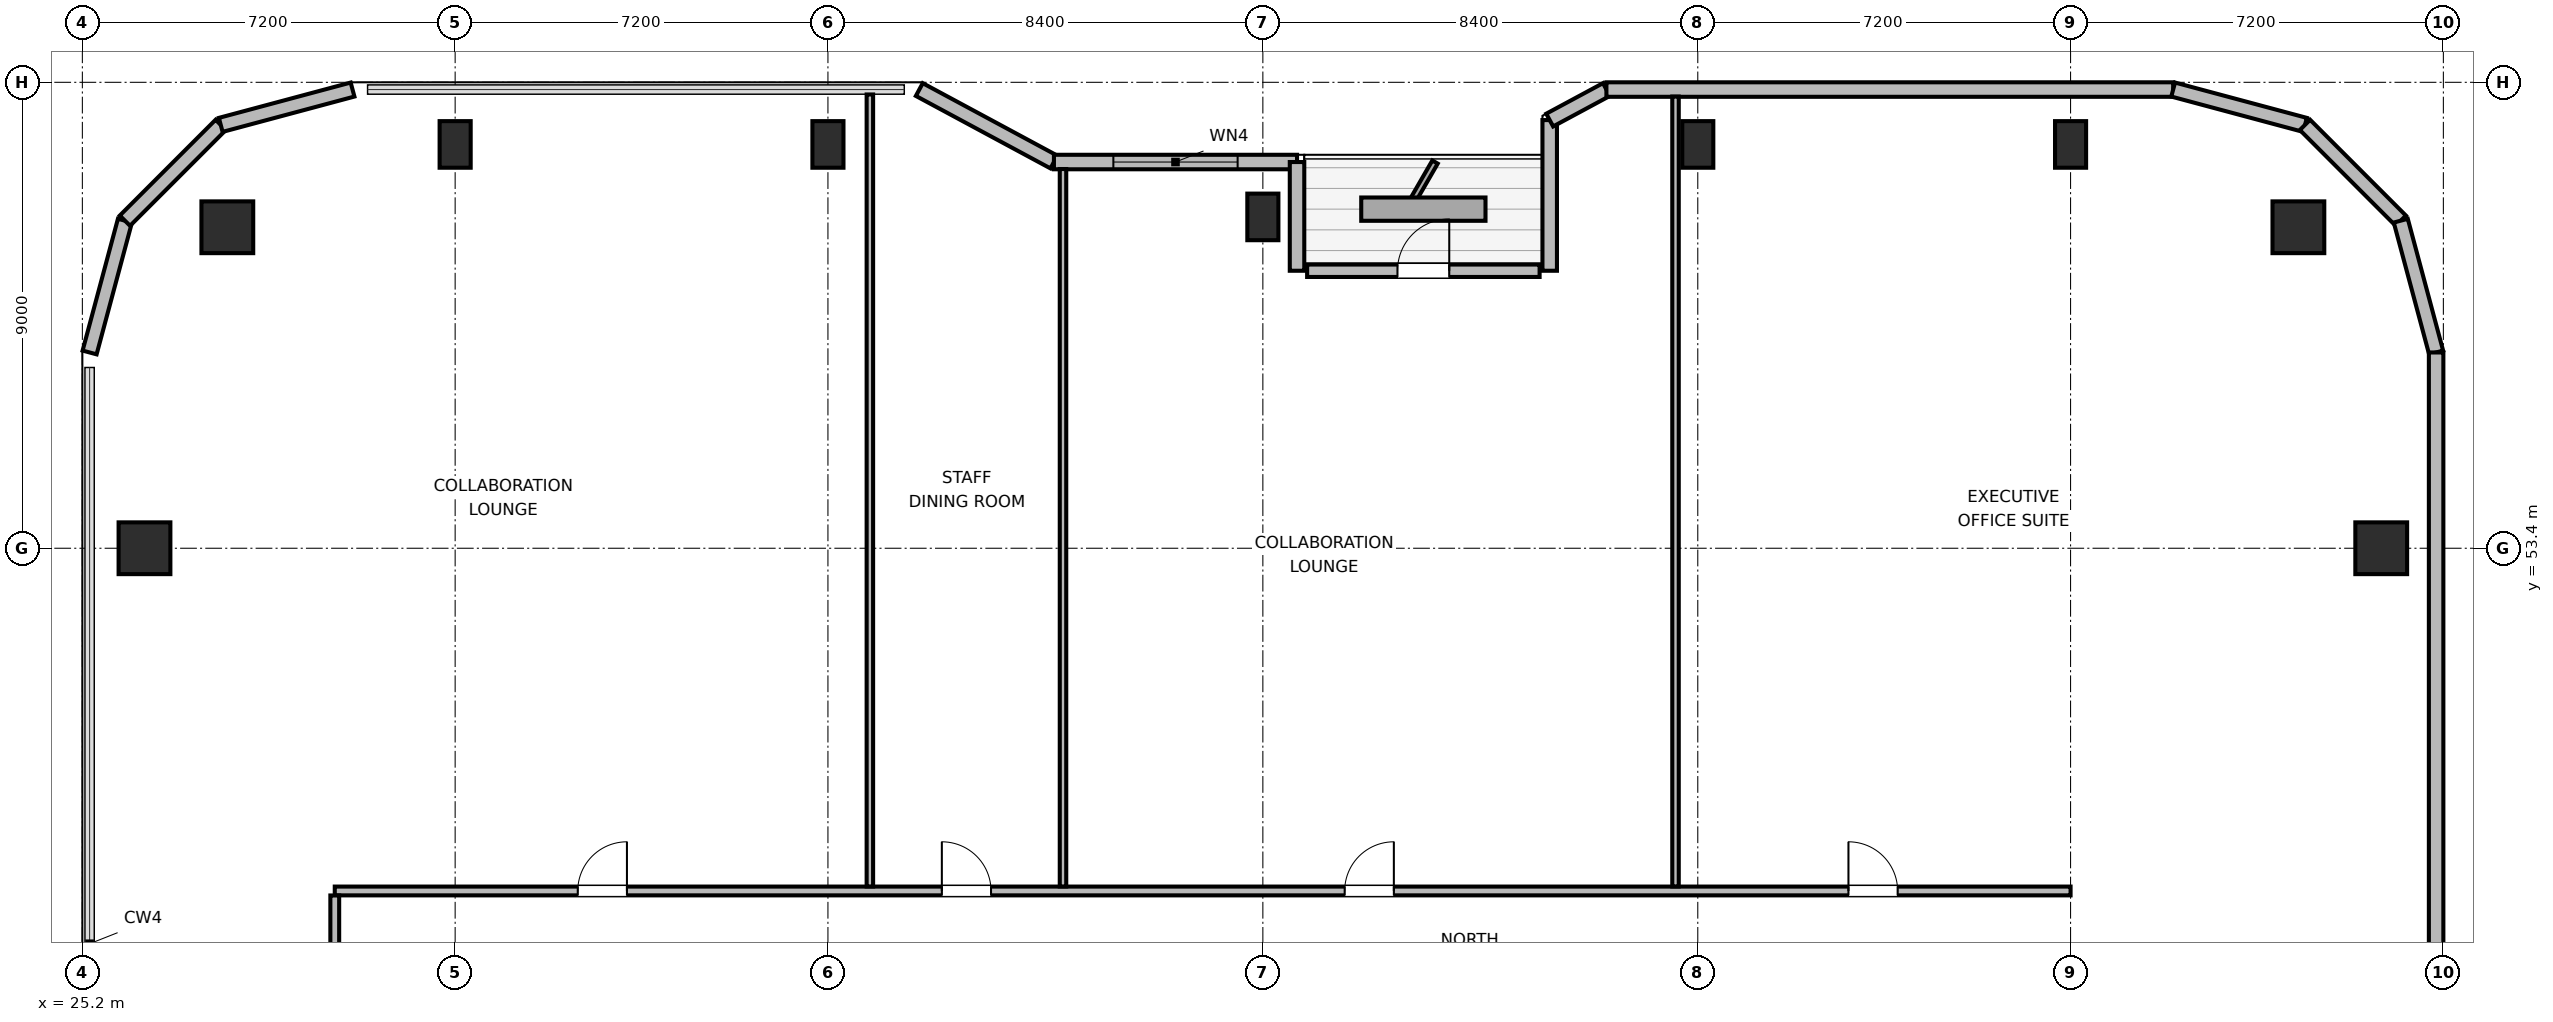
"""IFC4 building model, lengths in metres.
Left out: names, types, materials, properties, quantities, classifications, styles, units other than length and angle.
Written with IfcOpenShell. Run it as: python <this file> out.ifc"""

import sys

from ifc_helpers import new_model, si_unit, direction, frame, frame_2d, origin, origin_2d, place, context, subcontext, project, spatial, rectangle, circle, extrude, element, fill, save


model = new_model("IFC4")
c1 = context("Model", 3, precision=1e-05, world=origin(), true_north=direction((0.0, 1.0)))
c2 = subcontext(c1, "Body", "Model", "MODEL_VIEW")
j1 = project(units=[si_unit("LENGTHUNIT", "METRE"), si_unit("PLANEANGLEUNIT", "RADIAN")], contexts=[c1])
p1 = place(None, origin())
s1 = spatial("IfcSite", under=j1, at=p1, CompositionType="ELEMENT")
p2 = place(p1, origin())
s2 = spatial("IfcBuilding", under=s1, at=p2, CompositionType="ELEMENT")
p3 = place(p2, frame((0.0, 0.0, 251.1)))
s3 = spatial("IfcBuildingStorey", under=s2, at=p3, CompositionType="ELEMENT", Elevation=251.1)
for number, where, z_axis, x_axis in (
    (1, (68.0, 59.6, 0.0), (0.0, 0.0, 1.0), (1.0, 0.0, 0.0)),
    (2, (28.0, 59.6, 0.0), (0.0, 0.0, 1.0), (1.0, 0.0, 0.0)),
):
    element("IfcColumn", number, at=place(p3, frame(where, z_axis=z_axis, x_axis=x_axis)), inside=s3, PredefinedType="COLUMN", context=c2, shape_type="SweptSolid", body=[
        extrude(circle(Radius=0.5, at=origin_2d()), origin(), (0.0, 0.0, 1.0), 3.9),
    ])
for number, where, z_axis, x_axis in (
    (3, (32.4, 61.2, 0.0), (0.0, 0.0, 1.0), (1.0, 0.0, 0.0)),
    (4, (39.6, 61.2, 0.0), (0.0, 0.0, 1.0), (1.0, 0.0, 0.0)),
    (5, (48.0, 59.8, 0.0), (0.0, 0.0, 1.0), (1.0, 0.0, 0.0)),
    (6, (56.4, 61.2, 0.0), (0.0, 0.0, 1.0), (1.0, 0.0, 0.0)),
    (7, (63.6, 61.2, 0.0), (0.0, 0.0, 1.0), (1.0, 0.0, 0.0)),
):
    element("IfcColumn", number, at=place(p3, frame(where, z_axis=z_axis, x_axis=x_axis)), inside=s3, PredefinedType="COLUMN", context=c2, shape_type="SweptSolid", body=[
        extrude(rectangle(XDim=0.6, YDim=0.9, at=origin_2d()), origin(), (0.0, 0.0, 1.0), 3.9),
    ])
for number, where, z_axis, x_axis in (
    (8, (26.4, 53.4, 0.0), (0.0, 0.0, 1.0), (1.0, 0.0, 0.0)),
    (9, (69.6, 53.4, 0.0), (0.0, 0.0, 1.0), (1.0, 0.0, 0.0)),
):
    element("IfcColumn", number, at=place(p3, frame(where, z_axis=z_axis, x_axis=x_axis)), inside=s3, PredefinedType="COLUMN", context=c2, shape_type="SweptSolid", body=[
        extrude(rectangle(XDim=1.0, YDim=1.0, at=origin_2d()), origin(), (0.0, 0.0, 1.0), 3.9),
    ])
p4 = place(p3, frame((25.34, 57.182, 0.0), z_axis=(0.0, 0.0, 1.0), x_axis=(0.2588904131, 0.965906700466, 0.0)))
e10 = element("IfcWall", 10, at=p4, inside=s3, PredefinedType="SOLIDWALL", context=c2, shape_type="SweptSolid", body=[
    extrude(rectangle(XDim=2.636, YDim=0.28, at=frame_2d((1.318, 0.0))), origin(), (0.0, 0.0, 1.0), 3.68),
])
p5 = place(p3, frame((26.022, 59.728, 0.0), z_axis=(0.0, 0.0, 1.0), x_axis=(0.707153437963, 0.707060121331, 0.0)))
e11 = element("IfcWall", 11, at=p5, inside=s3, PredefinedType="SOLIDWALL", context=c2, shape_type="SweptSolid", body=[
    extrude(rectangle(XDim=2.616, YDim=0.28, at=frame_2d((1.308, 0.0))), origin(), (0.0, 0.0, 1.0), 3.68),
])
p6 = place(p3, frame((27.873, 61.577, 0.0), z_axis=(0.0, 0.0, 1.0), x_axis=(0.965883534663, 0.258976828051, 0.0)))
e12 = element("IfcWall", 12, at=p6, inside=s3, PredefinedType="SOLIDWALL", context=c2, shape_type="SweptSolid", body=[
    extrude(rectangle(XDim=2.636, YDim=0.28, at=frame_2d((1.318, 0.0))), origin(), (0.0, 0.0, 1.0), 3.68),
])
p7 = place(p3, frame((41.365, 62.26, 0.0), z_axis=(0.0, 0.0, 1.0), x_axis=(0.880473754814, -0.474094892488, 0.0)))
e13 = element("IfcWall", 13, at=p7, inside=s3, PredefinedType="SOLIDWALL", context=c2, shape_type="SweptSolid", body=[
    extrude(rectangle(XDim=2.953, YDim=0.28, at=frame_2d((1.477, 0.0))), origin(), (0.0, 0.0, 1.0), 2.195),
])
p8 = place(p3, frame((43.965, 60.86, 0.0), z_axis=(0.0, 0.0, 1.0), x_axis=(1.0, 0.0, 0.0)))
e14 = element("IfcWall", 14, at=p8, inside=s3, PredefinedType="SOLIDWALL", context=c2, shape_type="SweptSolid", body=[
    extrude(rectangle(XDim=4.695, YDim=0.28, at=frame_2d((2.348, 0.0))), origin(), (0.0, 0.0, 1.0), 2.195),
])
p9 = place(p8, frame((1.148, 0.0, 0.85)))
e15 = element("IfcOpeningElement", 15, at=p9, cuts=e14, PredefinedType="OPENING", context=c2, shape_type="SweptSolid", body=[
    extrude(rectangle(XDim=2.4, YDim=1.15, at=frame_2d((1.2, 0.575))), frame((0.0, 0.15, 0.0), z_axis=(0.0, -1.0, 0.0), x_axis=(1.0, 0.0, 0.0)), (0.0, 0.0, 1.0), 0.3),
])
p10 = place(p3, frame((48.66, 60.86, 0.0), z_axis=(0.0, 0.0, 1.0), x_axis=(0.0, -1.0, 0.0)))
e16 = element("IfcWall", 16, at=p10, inside=s3, PredefinedType="SOLIDWALL", context=c2, shape_type="SweptSolid", body=[
    extrude(rectangle(XDim=2.1, YDim=0.28, at=frame_2d((1.05, 0.0))), origin(), (0.0, 0.0, 1.0), 2.195),
])
p11 = place(p3, frame((48.855, 58.76, 0.0), z_axis=(0.0, 0.0, 1.0), x_axis=(1.0, 0.0, 0.0)))
e17 = element("IfcWall", 17, at=p11, inside=s3, PredefinedType="SOLIDWALL", context=c2, shape_type="SweptSolid", body=[
    extrude(rectangle(XDim=4.49, YDim=0.24, at=frame_2d((2.245, 0.0))), origin(), (0.0, 0.0, 1.0), 2.195),
])
p12 = place(p11, frame((1.745, 0.0, 0.0)))
e18 = element("IfcOpeningElement", 18, at=p12, cuts=e17, PredefinedType="OPENING", context=c2, shape_type="SweptSolid", body=[
    extrude(rectangle(XDim=1.0, YDim=2.02, at=frame_2d((0.5, 1.01))), frame((0.0, 0.13, 0.0), z_axis=(0.0, -1.0, 0.0), x_axis=(1.0, 0.0, 0.0)), (0.0, 0.0, 1.0), 0.26),
])
p13 = place(p3, frame((53.54, 58.76, 0.0), z_axis=(0.0, 0.0, 1.0), x_axis=(0.0, 1.0, 0.0)))
e19 = element("IfcWall", 19, at=p13, inside=s3, PredefinedType="SOLIDWALL", context=c2, shape_type="SweptSolid", body=[
    extrude(rectangle(XDim=2.91, YDim=0.28, at=frame_2d((1.455, 0.0))), origin(), (0.0, 0.0, 1.0), 2.195),
])
p14 = place(p3, frame((53.54, 61.67, 0.0), z_axis=(0.0, 0.0, 1.0), x_axis=(0.880515214249, 0.474017887296, 0.0)))
e20 = element("IfcWall", 20, at=p14, inside=s3, PredefinedType="SOLIDWALL", context=c2, shape_type="SweptSolid", body=[
    extrude(rectangle(XDim=1.244, YDim=0.28, at=frame_2d((0.622, 0.0))), origin(), (0.0, 0.0, 1.0), 3.68),
])
p15 = place(p3, frame((54.635, 62.26, 0.0), z_axis=(0.0, 0.0, 1.0), x_axis=(1.0, 0.0, 0.0)))
e21 = element("IfcWall", 21, at=p15, inside=s3, PredefinedType="SOLIDWALL", context=c2, shape_type="SweptSolid", body=[
    extrude(rectangle(XDim=10.946, YDim=0.28, at=frame_2d((5.473, 0.0))), origin(), (0.0, 0.0, 1.0), 3.68),
])
p16 = place(p3, frame((65.582, 62.26, 0.0), z_axis=(0.0, 0.0, 1.0), x_axis=(0.965883534663, -0.258976828051, 0.0)))
e22 = element("IfcWall", 22, at=p16, inside=s3, PredefinedType="SOLIDWALL", context=c2, shape_type="SweptSolid", body=[
    extrude(rectangle(XDim=2.636, YDim=0.28, at=frame_2d((1.318, 0.0))), origin(), (0.0, 0.0, 1.0), 3.68),
])
p17 = place(p3, frame((68.127, 61.577, 0.0), z_axis=(0.0, 0.0, 1.0), x_axis=(0.707153437963, -0.707060121331, 0.0)))
e23 = element("IfcWall", 23, at=p17, inside=s3, PredefinedType="SOLIDWALL", context=c2, shape_type="SweptSolid", body=[
    extrude(rectangle(XDim=2.616, YDim=0.28, at=frame_2d((1.308, 0.0))), origin(), (0.0, 0.0, 1.0), 3.68),
])
p18 = place(p3, frame((69.978, 59.728, 0.0), z_axis=(0.0, 0.0, 1.0), x_axis=(0.2588904131, -0.965906700466, 0.0)))
e24 = element("IfcWall", 24, at=p18, inside=s3, PredefinedType="SOLIDWALL", context=c2, shape_type="SweptSolid", body=[
    extrude(rectangle(XDim=2.636, YDim=0.28, at=frame_2d((1.318, 0.0))), origin(), (0.0, 0.0, 1.0), 3.68),
])
p19 = place(p3, frame((70.66, 57.182, 0.0), z_axis=(0.0, 0.0, 1.0), x_axis=(0.0, -1.0, 0.0)))
e25 = element("IfcWall", 25, at=p19, inside=s3, PredefinedType="SOLIDWALL", context=c2, shape_type="SweptSolid", body=[
    extrude(rectangle(XDim=14.442, YDim=0.28, at=frame_2d((7.221, 0.0))), origin(), (0.0, 0.0, 1.0), 3.68),
])
p20 = place(p3, frame((30.075, 46.78, 0.0), z_axis=(0.0, 0.0, 1.0), x_axis=(1.0, 0.0, 0.0)))
e26 = element("IfcWall", 26, at=p20, inside=s3, PredefinedType="PARTITIONING", context=c2, shape_type="SweptSolid", body=[
    extrude(rectangle(XDim=33.525, YDim=0.17, at=frame_2d((16.763, 0.0))), origin(), (0.0, 0.0, 1.0), 3.68),
])
p21 = place(p20, frame((4.693, 0.0, 0.0)))
e27 = element("IfcOpeningElement", 27, at=p21, cuts=e26, PredefinedType="OPENING", context=c2, shape_type="SweptSolid", body=[
    extrude(rectangle(XDim=0.95, YDim=2.04, at=frame_2d((0.475, 1.02))), frame((0.0, 0.095, 0.0), z_axis=(0.0, -1.0, 0.0), x_axis=(1.0, 0.0, 0.0)), (0.0, 0.0, 1.0), 0.19),
])
p22 = place(p20, frame((11.725, 0.0, 0.0)))
e28 = element("IfcOpeningElement", 28, at=p22, cuts=e26, PredefinedType="OPENING", context=c2, shape_type="SweptSolid", body=[
    extrude(rectangle(XDim=0.95, YDim=2.04, at=frame_2d((0.475, 1.02))), frame((0.0, 0.095, 0.0), z_axis=(0.0, -1.0, 0.0), x_axis=(1.0, 0.0, 0.0)), (0.0, 0.0, 1.0), 0.19),
])
p23 = place(p20, frame((19.505, 0.0, 0.0)))
e29 = element("IfcOpeningElement", 29, at=p23, cuts=e26, PredefinedType="OPENING", context=c2, shape_type="SweptSolid", body=[
    extrude(rectangle(XDim=0.95, YDim=2.04, at=frame_2d((0.475, 1.02))), frame((0.0, 0.095, 0.0), z_axis=(0.0, -1.0, 0.0), x_axis=(1.0, 0.0, 0.0)), (0.0, 0.0, 1.0), 0.19),
])
p24 = place(p20, frame((29.235, 0.0, 0.0)))
e30 = element("IfcOpeningElement", 30, at=p24, cuts=e26, PredefinedType="OPENING", context=c2, shape_type="SweptSolid", body=[
    extrude(rectangle(XDim=0.95, YDim=2.04, at=frame_2d((0.475, 1.02))), frame((0.0, 0.095, 0.0), z_axis=(0.0, -1.0, 0.0), x_axis=(1.0, 0.0, 0.0)), (0.0, 0.0, 1.0), 0.19),
])
p25 = place(p3, frame((30.075, 25.307, 0.0), z_axis=(0.0, 0.0, 1.0), x_axis=(0.0, 1.0, 0.0)))
e31 = element("IfcWall", 31, at=p25, inside=s3, PredefinedType="PARTITIONING", context=c2, shape_type="SweptSolid", body=[
    extrude(rectangle(XDim=21.386, YDim=0.17, at=frame_2d((10.693, 0.0))), origin(), (0.0, 0.0, 1.0), 3.68),
])
p26 = place(p25, frame((4.428, 0.0, 0.0)))
e32 = element("IfcOpeningElement", 32, at=p26, cuts=e31, PredefinedType="OPENING", context=c2, shape_type="SweptSolid", body=[
    extrude(rectangle(XDim=0.95, YDim=2.04, at=frame_2d((0.475, 1.02))), frame((0.0, 0.095, 0.0), z_axis=(0.0, -1.0, 0.0), x_axis=(1.0, 0.0, 0.0)), (0.0, 0.0, 1.0), 0.19),
])
p27 = place(p25, frame((15.208, 0.0, 0.0)))
e33 = element("IfcOpeningElement", 33, at=p27, cuts=e31, PredefinedType="OPENING", context=c2, shape_type="SweptSolid", body=[
    extrude(rectangle(XDim=0.95, YDim=2.04, at=frame_2d((0.475, 1.02))), frame((0.0, 0.095, 0.0), z_axis=(0.0, -1.0, 0.0), x_axis=(1.0, 0.0, 0.0)), (0.0, 0.0, 1.0), 0.19),
])
p28 = place(p3, frame((40.41, 46.867, 0.0), z_axis=(0.0, 0.0, 1.0), x_axis=(0.0, 1.0, 0.0)))
e34 = element("IfcWall", 34, at=p28, inside=s3, PredefinedType="PARTITIONING", context=c2, shape_type="SweptSolid", body=[
    extrude(rectangle(XDim=15.298, YDim=0.125, at=frame_2d((7.649, 0.0))), origin(), (0.0, 0.0, 1.0), 3.023),
])
p29 = place(p3, frame((44.14, 46.867, 0.0), z_axis=(0.0, 0.0, 1.0), x_axis=(0.0, 1.0, 0.0)))
e35 = element("IfcWall", 35, at=p29, inside=s3, PredefinedType="PARTITIONING", context=c2, shape_type="SweptSolid", body=[
    extrude(rectangle(XDim=13.858, YDim=0.125, at=frame_2d((6.929, 0.0))), origin(), (0.0, 0.0, 1.0), 3.023),
])
p30 = place(p3, frame((55.97, 46.867, 0.0), z_axis=(0.0, 0.0, 1.0), x_axis=(0.0, 1.0, 0.0)))
e36 = element("IfcWall", 36, at=p30, inside=s3, PredefinedType="PARTITIONING", context=c2, shape_type="SweptSolid", body=[
    extrude(rectangle(XDim=15.258, YDim=0.125, at=frame_2d((7.629, 0.0))), origin(), (0.0, 0.0, 1.0), 2.195),
])
p31 = place(p9, origin())
e37 = element("IfcWindow", 37, at=p31, inside=s3, PartitioningType="SINGLE_PANEL", PredefinedType="WINDOW", context=c2, shape_type="SweptSolid", body=[
    extrude(rectangle(XDim=2.4, YDim=1.15, at=frame_2d((1.2, 0.575))), frame((0.0, 0.03, 0.0), z_axis=(0.0, -1.0, 0.0), x_axis=(1.0, 0.0, 0.0)), (0.0, 0.0, 1.0), 0.06),
])
fill(e15, e37)
p32 = place(p12, origin())
e38 = element("IfcDoor", 38, at=p32, inside=s3, OperationType="SINGLE_SWING_RIGHT", PredefinedType="DOOR", context=c2, shape_type="SweptSolid", body=[
    extrude(rectangle(XDim=1.0, YDim=2.02, at=frame_2d((0.5, 1.01))), frame((0.0, 0.025, 0.0), z_axis=(0.0, -1.0, 0.0), x_axis=(1.0, 0.0, 0.0)), (0.0, 0.0, 1.0), 0.05),
])
fill(e18, e38)
p33 = place(p21, origin())
e39 = element("IfcDoor", 39, at=p33, inside=s3, OperationType="SINGLE_SWING_RIGHT", PredefinedType="DOOR", context=c2, shape_type="SweptSolid", body=[
    extrude(rectangle(XDim=0.95, YDim=2.04, at=frame_2d((0.475, 1.02))), frame((0.0, 0.025, 0.0), z_axis=(0.0, -1.0, 0.0), x_axis=(1.0, 0.0, 0.0)), (0.0, 0.0, 1.0), 0.05),
])
fill(e27, e39)
p34 = place(p22, origin())
e40 = element("IfcDoor", 40, at=p34, inside=s3, OperationType="SINGLE_SWING_LEFT", PredefinedType="DOOR", context=c2, shape_type="SweptSolid", body=[
    extrude(rectangle(XDim=0.95, YDim=2.04, at=frame_2d((0.475, 1.02))), frame((0.0, 0.025, 0.0), z_axis=(0.0, -1.0, 0.0), x_axis=(1.0, 0.0, 0.0)), (0.0, 0.0, 1.0), 0.05),
])
fill(e28, e40)
p35 = place(p23, origin())
e41 = element("IfcDoor", 41, at=p35, inside=s3, OperationType="SINGLE_SWING_RIGHT", PredefinedType="DOOR", context=c2, shape_type="SweptSolid", body=[
    extrude(rectangle(XDim=0.95, YDim=2.04, at=frame_2d((0.475, 1.02))), frame((0.0, 0.025, 0.0), z_axis=(0.0, -1.0, 0.0), x_axis=(1.0, 0.0, 0.0)), (0.0, 0.0, 1.0), 0.05),
])
fill(e29, e41)
p36 = place(p24, origin())
e42 = element("IfcDoor", 42, at=p36, inside=s3, OperationType="SINGLE_SWING_LEFT", PredefinedType="DOOR", context=c2, shape_type="SweptSolid", body=[
    extrude(rectangle(XDim=0.95, YDim=2.04, at=frame_2d((0.475, 1.02))), frame((0.0, 0.025, 0.0), z_axis=(0.0, -1.0, 0.0), x_axis=(1.0, 0.0, 0.0)), (0.0, 0.0, 1.0), 0.05),
])
fill(e30, e42)
save(model, sys.argv[1])
